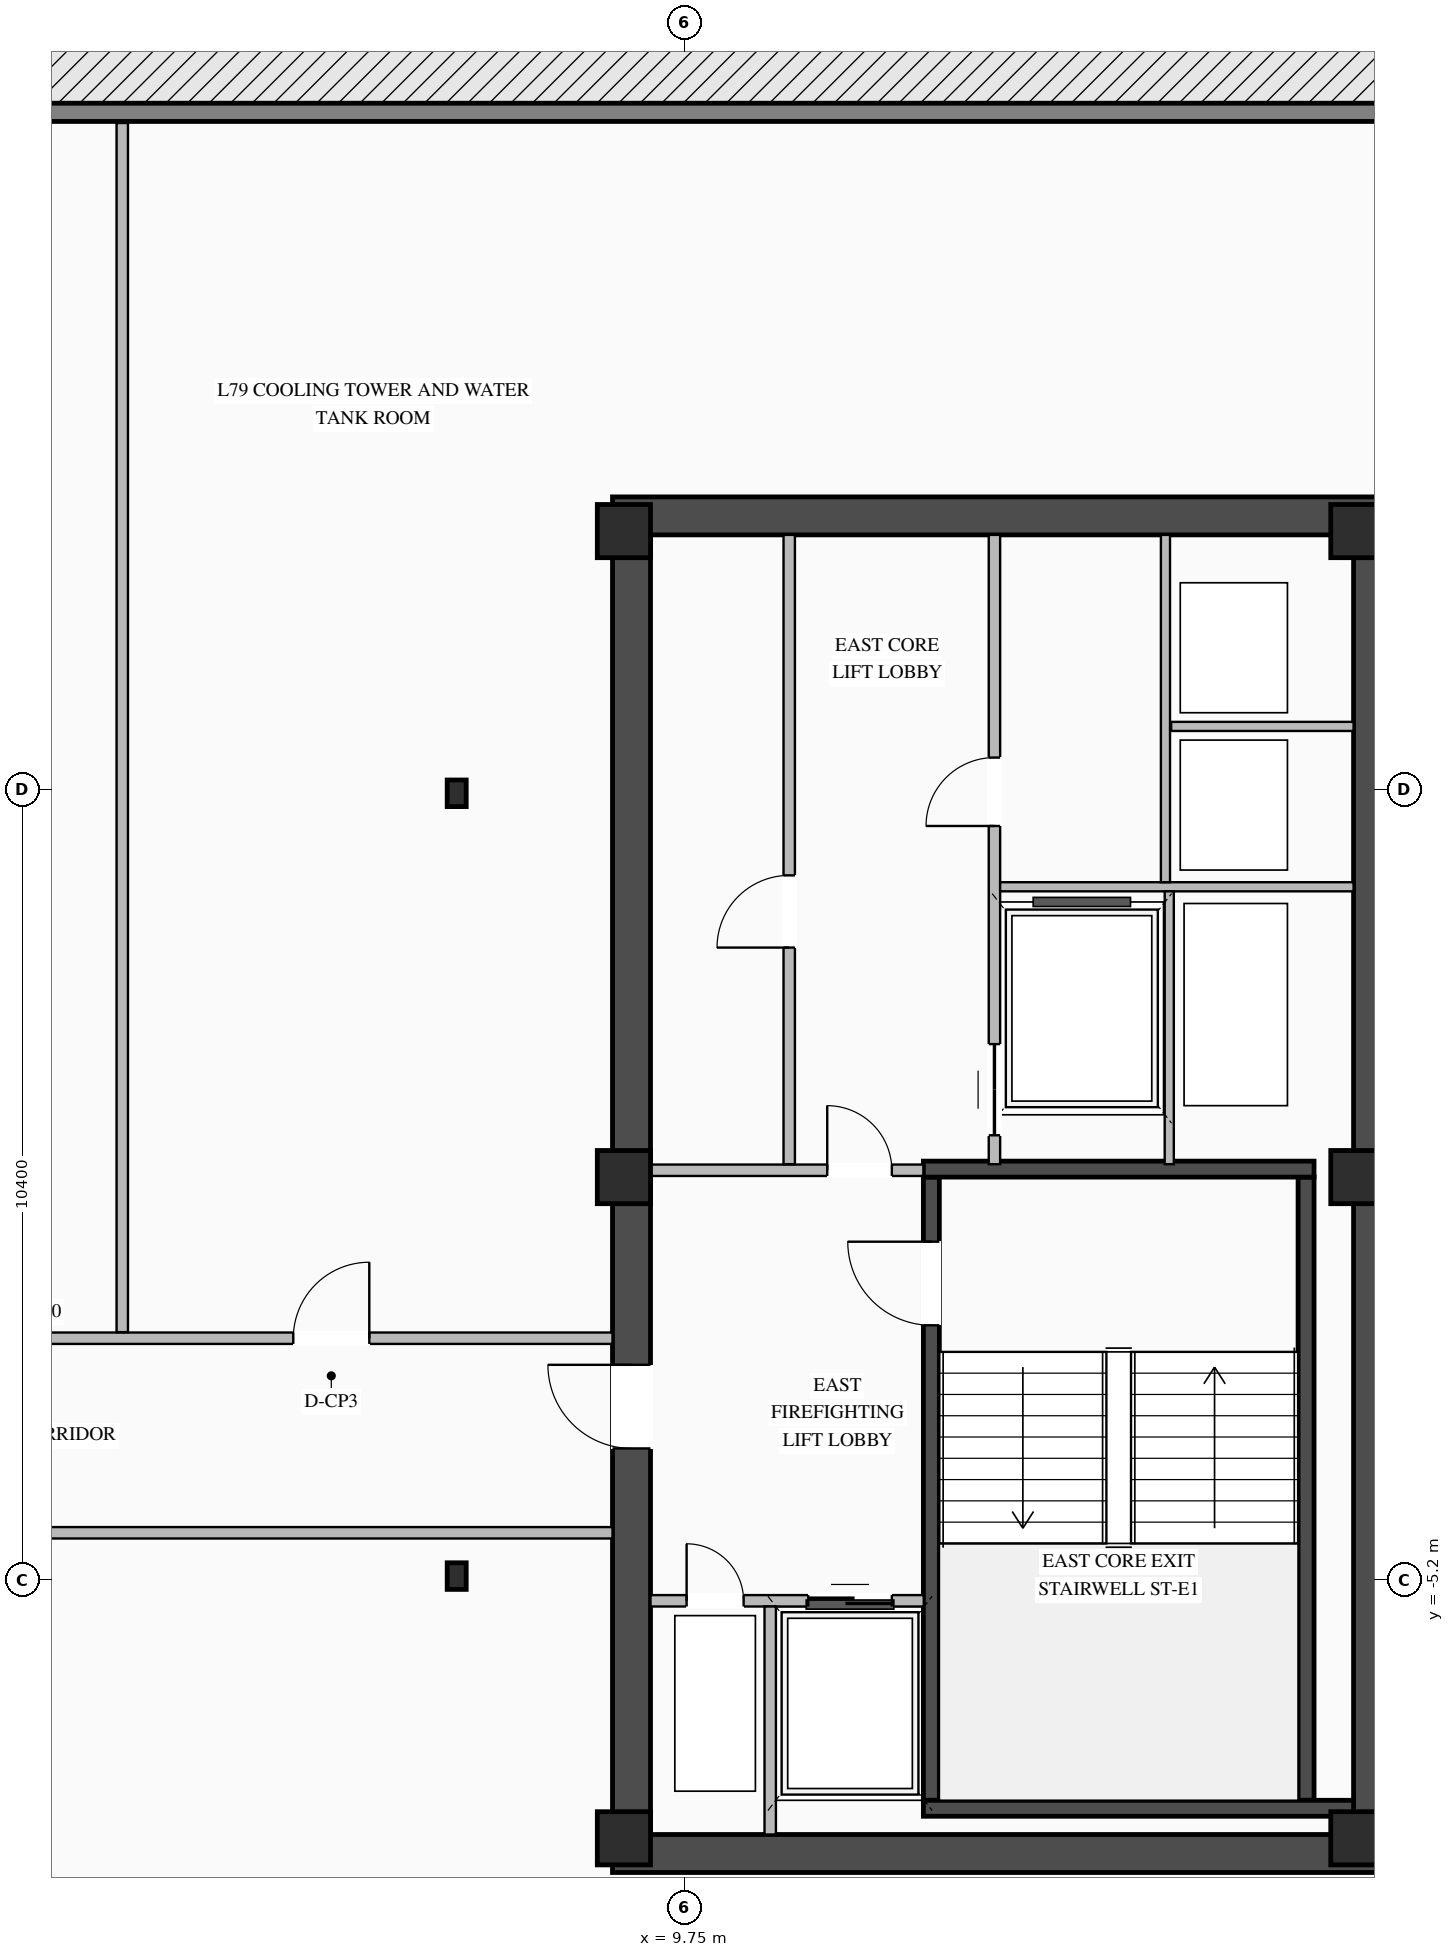
"""IFC4 building model, lengths in metres.
Left out: names, types, materials, properties, quantities, classifications, styles, units other than length and angle.
Written with IfcOpenShell. Run it as: python <this file> out.ifc"""

import sys

from ifc_helpers import new_model, si_unit, direction, frame, frame_2d, origin, origin_2d, place, context, subcontext, project, spatial, rectangle, i_section, extrude, element, fill, save


model = new_model("IFC4")
c1 = context("Model", 3, precision=1e-05, world=origin(), true_north=direction((0.0, 1.0)))
c2 = subcontext(c1, "Body", "Model", "MODEL_VIEW")
j1 = project(units=[si_unit("LENGTHUNIT", "METRE"), si_unit("PLANEANGLEUNIT", "RADIAN")], contexts=[c1])
p1 = place(None, origin())
s1 = spatial("IfcSite", under=j1, at=p1, CompositionType="ELEMENT")
p2 = place(p1, origin())
s2 = spatial("IfcBuilding", under=s1, at=p2, CompositionType="ELEMENT")
p3 = place(p2, frame((0.0, 0.0, 290.55)))
s3 = spatial("IfcBuildingStorey", under=s2, at=p3, CompositionType="ELEMENT", Elevation=290.55)
for number, where, z_axis, x_axis in (
    (1, (8.8, -8.8, 0.0), (0.0, 0.0, 1.0), (1.0, 0.0, 0.0)),
    (2, (8.8, 8.8, 0.0), (0.0, 0.0, 1.0), (1.0, 0.0, 0.0)),
):
    element("IfcWall", number, at=place(p3, frame(where, z_axis=z_axis, x_axis=x_axis)), inside=s3, PredefinedType="SHEAR", context=c2, shape_type="SweptSolid", body=[
        extrude(rectangle(XDim=10.25, YDim=0.5, at=frame_2d((5.125, 0.0))), origin(), (0.0, 0.0, 1.0), 3.35),
    ])
p4 = place(p3, frame((9.05, -8.55, 0.0), z_axis=(0.0, 0.0, 1.0), x_axis=(0.0, 1.0, 0.0)))
e3 = element("IfcWall", 3, at=p4, inside=s3, PredefinedType="SHEAR", context=c2, shape_type="SweptSolid", body=[
    extrude(rectangle(XDim=17.1, YDim=0.5, at=frame_2d((8.55, 0.0))), origin(), (0.0, 0.0, 1.0), 3.35),
])
p5 = place(p4, frame((5.08, 0.0, 0.0)))
e4 = element("IfcOpeningElement", 4, at=p5, cuts=e3, PredefinedType="OPENING", context=c2, shape_type="SweptSolid", body=[
    extrude(rectangle(XDim=1.1, YDim=2.08, at=frame_2d((0.55, 1.04))), frame((0.0, 0.26, 0.0), z_axis=(0.0, -1.0, 0.0), x_axis=(1.0, 0.0, 0.0)), (0.0, 0.0, 1.0), 0.52),
])
p6 = place(p3, frame((18.8, -8.55, 0.0), z_axis=(0.0, 0.0, 1.0), x_axis=(0.0, 1.0, 0.0)))
e5 = element("IfcWall", 5, at=p6, inside=s3, PredefinedType="SHEAR", context=c2, shape_type="SweptSolid", body=[
    extrude(rectangle(XDim=17.1, YDim=0.5, at=frame_2d((8.55, 0.0))), origin(), (0.0, 0.0, 1.0), 3.35),
])
p7 = place(p3, frame((12.995, -8.1, 0.0), z_axis=(0.0, 0.0, 1.0), x_axis=(0.0, 1.0, 0.0)))
e6 = element("IfcWall", 6, at=p7, inside=s3, PredefinedType="SHEAR", context=c2, shape_type="SweptSolid", body=[
    extrude(rectangle(XDim=8.2, YDim=0.21, at=frame_2d((4.1, 0.0))), origin(), (0.0, 0.0, 1.0), 3.35),
])
p8 = place(p7, frame((6.25, 0.0, 0.0)))
e7 = element("IfcOpeningElement", 7, at=p8, cuts=e6, PredefinedType="OPENING", context=c2, shape_type="SweptSolid", body=[
    extrude(rectangle(XDim=1.1, YDim=2.15, at=frame_2d((0.55, 1.075))), frame((0.0, 0.115, 0.0), z_axis=(0.0, -1.0, 0.0), x_axis=(1.0, 0.0, 0.0)), (0.0, 0.0, 1.0), 0.23),
])
p9 = place(p3, frame((17.925, -8.1, 0.0), z_axis=(0.0, 0.0, 1.0), x_axis=(0.0, 1.0, 0.0)))
e8 = element("IfcWall", 8, at=p9, inside=s3, PredefinedType="SHEAR", context=c2, shape_type="SweptSolid", body=[
    extrude(rectangle(XDim=8.2, YDim=0.21, at=frame_2d((4.1, 0.0))), origin(), (0.0, 0.0, 1.0), 3.35),
])
p10 = place(p3, frame((12.89, -8.205, 0.0), z_axis=(0.0, 0.0, 1.0), x_axis=(1.0, 0.0, 0.0)))
e9 = element("IfcWall", 9, at=p10, inside=s3, PredefinedType="SHEAR", context=c2, shape_type="SweptSolid", body=[
    extrude(rectangle(XDim=5.66, YDim=0.21, at=frame_2d((2.83, 0.0))), origin(), (0.0, 0.0, 1.0), 3.35),
])
p11 = place(p3, frame((18.03, 0.205, 0.0), z_axis=(0.0, 0.0, 1.0), x_axis=(-1.0, 0.0, 0.0)))
e10 = element("IfcWall", 10, at=p11, inside=s3, PredefinedType="SHEAR", context=c2, shape_type="SweptSolid", body=[
    extrude(rectangle(XDim=5.14, YDim=0.21, at=frame_2d((2.57, 0.0))), origin(), (0.0, 0.0, 1.0), 3.35),
])
for number, where, z_axis, x_axis in (
    (11, (8.95, -8.6, 0.0), (0.0, 0.0, 1.0), (1.0, 0.0, 0.0)),
    (12, (8.95, 0.1, 0.0), (0.0, 0.0, 1.0), (1.0, 0.0, 0.0)),
    (13, (8.95, 8.6, 0.0), (0.0, 0.0, 1.0), (1.0, 0.0, 0.0)),
    (14, (18.6, -8.6, 0.0), (0.0, 0.0, 1.0), (1.0, 0.0, 0.0)),
    (15, (18.6, 0.1, 0.0), (0.0, 0.0, 1.0), (1.0, 0.0, 0.0)),
    (16, (18.6, 8.6, 0.0), (0.0, 0.0, 1.0), (1.0, 0.0, 0.0)),
):
    element("IfcColumn", number, at=place(p3, frame(where, z_axis=z_axis, x_axis=x_axis)), inside=s3, PredefinedType="COLUMN", context=c2, shape_type="SweptSolid", body=[
        extrude(rectangle(XDim=0.7, YDim=0.7, at=origin_2d()), origin(), (0.0, 0.0, 1.0), 3.6),
    ])
for number, where, z_axis, x_axis in (
    (17, (6.75, -5.15, 0.0), (0.0, 0.0, 1.0), (1.0, 0.0, 0.0)),
    (18, (6.75, 5.15, 0.0), (0.0, 0.0, 1.0), (1.0, 0.0, 0.0)),
):
    element("IfcColumn", number, at=place(p3, frame(where, z_axis=z_axis, x_axis=x_axis)), inside=s3, PredefinedType="COLUMN", context=c2, shape_type="SweptSolid", body=[
        extrude(i_section(OverallWidth=0.25, OverallDepth=0.35, WebThickness=0.01, FlangeThickness=0.012, at=origin_2d()), origin(), (0.0, 0.0, 1.0), 3.6),
    ])
p12 = place(p3, frame((25.76, 14.11, 0.0), z_axis=(0.0, 0.0, 1.0), x_axis=(-1.0, 0.0, 0.0)))
e19 = element("IfcWall", 19, at=p12, inside=s3, PredefinedType="STANDARD", context=c2, shape_type="SweptSolid", body=[
    extrude(rectangle(XDim=47.12, YDim=0.24, at=frame_2d((23.56, 0.0))), origin(), (0.0, 0.0, 1.0), 3.33),
])
p13 = place(p3, frame((-10.19, 14.482, 0.0), z_axis=(0.0, 0.0, 1.0), x_axis=(0.995396003119, 0.095847780233, 0.0)))
e20 = element("IfcWall", 20, at=p13, inside=s3, PredefinedType="PARAPET", context=c2, shape_type="SweptSolid", body=[
    extrude(rectangle(XDim=36.391, YDim=0.25, at=frame_2d((18.196, 0.0))), origin(), (0.0, 0.0, 1.0), 1.2),
])
p14 = place(p3, frame((9.3, -5.475, 0.0), z_axis=(0.0, 0.0, 1.0), x_axis=(1.0, 0.0, 0.0)))
e21 = element("IfcWall", 21, at=p14, inside=s3, PredefinedType="STANDARD", context=c2, shape_type="SweptSolid", body=[
    extrude(rectangle(XDim=3.595, YDim=0.15, at=frame_2d((1.797, 0.0))), origin(), (0.0, 0.0, 1.0), 3.33),
])
p15 = place(p14, frame((2.075, 0.0, 0.0)))
e22 = element("IfcOpeningElement", 22, at=p15, cuts=e21, PredefinedType="OPENING", context=c2, shape_type="SweptSolid", body=[
    extrude(rectangle(XDim=1.1, YDim=2.15, at=frame_2d((0.55, 1.075))), frame((0.0, 0.085, 0.0), z_axis=(0.0, -1.0, 0.0), x_axis=(1.0, 0.0, 0.0)), (0.0, 0.0, 1.0), 0.17),
])
p16 = place(p14, frame((0.475, 0.0, 0.0)))
e23 = element("IfcOpeningElement", 23, at=p16, cuts=e21, PredefinedType="OPENING", context=c2, shape_type="SweptSolid", body=[
    extrude(rectangle(XDim=0.75, YDim=2.05, at=frame_2d((0.375, 1.025))), frame((0.0, 0.085, 0.0), z_axis=(0.0, -1.0, 0.0), x_axis=(1.0, 0.0, 0.0)), (0.0, 0.0, 1.0), 0.17),
])
p17 = place(p3, frame((10.875, -8.55, 0.0), z_axis=(0.0, 0.0, 1.0), x_axis=(0.0, 1.0, 0.0)))
e24 = element("IfcWall", 24, at=p17, inside=s3, PredefinedType="STANDARD", context=c2, shape_type="SweptSolid", body=[
    extrude(rectangle(XDim=3.0, YDim=0.15, at=frame_2d((1.5, 0.0))), origin(), (0.0, 0.0, 1.0), 3.33),
])
p18 = place(p3, frame((9.3, 0.19, 0.0), z_axis=(0.0, 0.0, 1.0), x_axis=(1.0, 0.0, 0.0)))
e25 = element("IfcWall", 25, at=p18, inside=s3, PredefinedType="STANDARD", context=c2, shape_type="SweptSolid", body=[
    extrude(rectangle(XDim=3.59, YDim=0.15, at=frame_2d((1.795, 0.0))), origin(), (0.0, 0.0, 1.0), 2.825),
])
p19 = place(p18, frame((2.325, 0.0, 0.0)))
e26 = element("IfcOpeningElement", 26, at=p19, cuts=e25, PredefinedType="OPENING", context=c2, shape_type="SweptSolid", body=[
    extrude(rectangle(XDim=0.85, YDim=2.04, at=frame_2d((0.425, 1.02))), frame((0.0, 0.085, 0.0), z_axis=(0.0, -1.0, 0.0), x_axis=(1.0, 0.0, 0.0)), (0.0, 0.0, 1.0), 0.17),
])
p20 = place(p3, frame((11.125, 0.27, 0.0), z_axis=(0.0, 0.0, 1.0), x_axis=(0.0, 1.0, 0.0)))
e27 = element("IfcWall", 27, at=p20, inside=s3, PredefinedType="STANDARD", context=c2, shape_type="SweptSolid", body=[
    extrude(rectangle(XDim=8.28, YDim=0.15, at=frame_2d((4.14, 0.0))), origin(), (0.0, 0.0, 1.0), 3.33),
])
p21 = place(p20, frame((2.85, 0.0, 0.0)))
e28 = element("IfcOpeningElement", 28, at=p21, cuts=e27, PredefinedType="OPENING", context=c2, shape_type="SweptSolid", body=[
    extrude(rectangle(XDim=0.95, YDim=2.05, at=frame_2d((0.475, 1.025))), frame((0.0, 0.085, 0.0), z_axis=(0.0, -1.0, 0.0), x_axis=(1.0, 0.0, 0.0)), (0.0, 0.0, 1.0), 0.17),
])
p22 = place(p3, frame((13.825, 0.27, 0.0), z_axis=(0.0, 0.0, 1.0), x_axis=(0.0, 1.0, 0.0)))
e29 = element("IfcWall", 29, at=p22, inside=s3, PredefinedType="STANDARD", context=c2, shape_type="SweptSolid", body=[
    extrude(rectangle(XDim=8.28, YDim=0.15, at=frame_2d((4.14, 0.0))), origin(), (0.0, 0.0, 1.0), 3.33),
])
p23 = place(p22, frame((4.45, 0.0, 0.0)))
e30 = element("IfcOpeningElement", 30, at=p23, cuts=e29, PredefinedType="OPENING", context=c2, shape_type="SweptSolid", body=[
    extrude(rectangle(XDim=0.9, YDim=2.05, at=frame_2d((0.45, 1.025))), frame((0.0, 0.085, 0.0), z_axis=(0.0, -1.0, 0.0), x_axis=(1.0, 0.0, 0.0)), (0.0, 0.0, 1.0), 0.17),
])
p24 = place(p22, frame((0.38, 0.0, 0.0)))
e31 = element("IfcOpeningElement", 31, at=p24, cuts=e29, PredefinedType="OPENING", context=c2, shape_type="SweptSolid", body=[
    extrude(rectangle(XDim=1.2, YDim=2.1, at=frame_2d((0.6, 1.05))), frame((0.0, 0.085, 0.0), z_axis=(0.0, -1.0, 0.0), x_axis=(1.0, 0.0, 0.0)), (0.0, 0.0, 1.0), 0.17),
])
p25 = place(p3, frame((13.9, 3.92, 0.0), z_axis=(0.0, 0.0, 1.0), x_axis=(1.0, 0.0, 0.0)))
e32 = element("IfcWall", 32, at=p25, inside=s3, PredefinedType="STANDARD", context=c2, shape_type="SweptSolid", body=[
    extrude(rectangle(XDim=4.65, YDim=0.12, at=frame_2d((2.325, 0.0))), origin(), (0.0, 0.0, 1.0), 3.33),
])
p26 = place(p3, frame((16.15, 6.03, 0.0), z_axis=(0.0, 0.0, 1.0), x_axis=(1.0, 0.0, 0.0)))
e33 = element("IfcWall", 33, at=p26, inside=s3, PredefinedType="STANDARD", context=c2, shape_type="SweptSolid", body=[
    extrude(rectangle(XDim=2.4, YDim=0.12, at=frame_2d((1.2, 0.0))), origin(), (0.0, 0.0, 1.0), 3.33),
])
p27 = place(p3, frame((16.075, 3.98, 0.0), z_axis=(0.0, 0.0, 1.0), x_axis=(0.0, 1.0, 0.0)))
e34 = element("IfcWall", 34, at=p27, inside=s3, PredefinedType="STANDARD", context=c2, shape_type="SweptSolid", body=[
    extrude(rectangle(XDim=4.57, YDim=0.12, at=frame_2d((2.285, 0.0))), origin(), (0.0, 0.0, 1.0), 3.33),
])
p28 = place(p3, frame((16.125, 0.27, 0.0), z_axis=(0.0, 0.0, 1.0), x_axis=(0.0, 1.0, 0.0)))
e35 = element("IfcWall", 35, at=p28, inside=s3, PredefinedType="STANDARD", context=c2, shape_type="SweptSolid", body=[
    extrude(rectangle(XDim=3.59, YDim=0.12, at=frame_2d((1.795, 0.0))), origin(), (0.0, 0.0, 1.0), 3.33),
])
p29 = place(p3, frame((-8.8, -2.02, 0.0), z_axis=(0.0, 0.0, 1.0), x_axis=(1.0, 0.0, 0.0)))
e36 = element("IfcWall", 36, at=p29, inside=s3, PredefinedType="STANDARD", context=c2, shape_type="SweptSolid", body=[
    extrude(rectangle(XDim=17.6, YDim=0.15, at=frame_2d((8.8, 0.0))), origin(), (0.0, 0.0, 1.0), 3.33),
])
p30 = place(p29, frame((4.6, 0.0, 0.0)))
e37 = element("IfcOpeningElement", 37, at=p30, cuts=e36, PredefinedType="OPENING", context=c2, shape_type="SweptSolid", body=[
    extrude(rectangle(XDim=1.0, YDim=2.02, at=frame_2d((0.5, 1.01))), frame((0.0, 0.085, 0.0), z_axis=(0.0, -1.0, 0.0), x_axis=(1.0, 0.0, 0.0)), (0.0, 0.0, 1.0), 0.17),
])
p31 = place(p29, frame((13.4, 0.0, 0.0)))
e38 = element("IfcOpeningElement", 38, at=p31, cuts=e36, PredefinedType="OPENING", context=c2, shape_type="SweptSolid", body=[
    extrude(rectangle(XDim=1.0, YDim=2.02, at=frame_2d((0.5, 1.01))), frame((0.0, 0.085, 0.0), z_axis=(0.0, -1.0, 0.0), x_axis=(1.0, 0.0, 0.0)), (0.0, 0.0, 1.0), 0.17),
])
p32 = place(p3, frame((2.35, -1.94, 0.0), z_axis=(0.0, 0.0, 1.0), x_axis=(0.0, 1.0, 0.0)))
e39 = element("IfcWall", 39, at=p32, inside=s3, PredefinedType="STANDARD", context=c2, shape_type="SweptSolid", body=[
    extrude(rectangle(XDim=15.91, YDim=0.15, at=frame_2d((7.955, 0.0))), origin(), (0.0, 0.0, 1.0), 3.33),
])
p33 = place(p3, frame((-8.8, -4.58, 0.0), z_axis=(0.0, 0.0, 1.0), x_axis=(1.0, 0.0, 0.0)))
e40 = element("IfcWall", 40, at=p33, inside=s3, PredefinedType="STANDARD", context=c2, shape_type="SweptSolid", body=[
    extrude(rectangle(XDim=17.6, YDim=0.15, at=frame_2d((8.8, 0.0))), origin(), (0.0, 0.0, 1.0), 3.33),
])
p34 = place(p33, frame((4.6, 0.0, 0.0)))
e41 = element("IfcOpeningElement", 41, at=p34, cuts=e40, PredefinedType="OPENING", context=c2, shape_type="SweptSolid", body=[
    extrude(rectangle(XDim=1.0, YDim=2.02, at=frame_2d((0.5, 1.01))), frame((0.0, 0.085, 0.0), z_axis=(0.0, -1.0, 0.0), x_axis=(1.0, 0.0, 0.0)), (0.0, 0.0, 1.0), 0.17),
])
p35 = place(p8, origin())
e42 = element("IfcDoor", 42, at=p35, inside=s3, OperationType="SINGLE_SWING_RIGHT", PredefinedType="DOOR", context=c2, shape_type="SweptSolid", body=[
    extrude(rectangle(XDim=1.1, YDim=2.15, at=frame_2d((0.55, 1.075))), frame((0.0, 0.025, 0.0), z_axis=(0.0, -1.0, 0.0), x_axis=(1.0, 0.0, 0.0)), (0.0, 0.0, 1.0), 0.05),
])
fill(e7, e42)
p36 = place(p15, origin())
e43 = element("IfcDoor", 43, at=p36, inside=s3, OperationType="DOUBLE_DOOR_SLIDING", PredefinedType="DOOR", context=c2, shape_type="SweptSolid", body=[
    extrude(rectangle(XDim=1.1, YDim=2.15, at=frame_2d((0.55, 1.075))), frame((0.0, 0.025, 0.0), z_axis=(0.0, -1.0, 0.0), x_axis=(1.0, 0.0, 0.0)), (0.0, 0.0, 1.0), 0.05),
])
fill(e22, e43)
p37 = place(p16, origin())
e44 = element("IfcDoor", 44, at=p37, inside=s3, OperationType="SINGLE_SWING_LEFT", PredefinedType="DOOR", context=c2, shape_type="SweptSolid", body=[
    extrude(rectangle(XDim=0.75, YDim=2.05, at=frame_2d((0.375, 1.025))), frame((0.0, 0.025, 0.0), z_axis=(0.0, -1.0, 0.0), x_axis=(1.0, 0.0, 0.0)), (0.0, 0.0, 1.0), 0.05),
])
fill(e23, e44)
p38 = place(p19, origin())
e45 = element("IfcDoor", 45, at=p38, inside=s3, OperationType="SINGLE_SWING_LEFT", PredefinedType="DOOR", context=c2, shape_type="SweptSolid", body=[
    extrude(rectangle(XDim=0.85, YDim=2.04, at=frame_2d((0.425, 1.02))), frame((0.0, 0.025, 0.0), z_axis=(0.0, -1.0, 0.0), x_axis=(1.0, 0.0, 0.0)), (0.0, 0.0, 1.0), 0.05),
])
fill(e26, e45)
p39 = place(p5, origin())
e46 = element("IfcDoor", 46, at=p39, inside=s3, OperationType="SINGLE_SWING_RIGHT", PredefinedType="DOOR", context=c2, shape_type="SweptSolid", body=[
    extrude(rectangle(XDim=1.1, YDim=2.08, at=frame_2d((0.55, 1.04))), frame((0.0, -0.155, 0.0), z_axis=(0.0, -1.0, 0.0), x_axis=(1.0, 0.0, 0.0)), (0.0, 0.0, 1.0), 0.05),
])
fill(e4, e46)
p40 = place(p21, origin())
e47 = element("IfcDoor", 47, at=p40, inside=s3, OperationType="SINGLE_SWING_LEFT", PredefinedType="DOOR", context=c2, shape_type="SweptSolid", body=[
    extrude(rectangle(XDim=0.95, YDim=2.05, at=frame_2d((0.475, 1.025))), frame((0.0, 0.025, 0.0), z_axis=(0.0, -1.0, 0.0), x_axis=(1.0, 0.0, 0.0)), (0.0, 0.0, 1.0), 0.05),
])
fill(e28, e47)
p41 = place(p23, origin())
e48 = element("IfcDoor", 48, at=p41, inside=s3, OperationType="SINGLE_SWING_LEFT", PredefinedType="DOOR", context=c2, shape_type="SweptSolid", body=[
    extrude(rectangle(XDim=0.9, YDim=2.05, at=frame_2d((0.45, 1.025))), frame((0.0, 0.025, 0.0), z_axis=(0.0, -1.0, 0.0), x_axis=(1.0, 0.0, 0.0)), (0.0, 0.0, 1.0), 0.05),
])
fill(e30, e48)
p42 = place(p24, origin())
e49 = element("IfcDoor", 49, at=p42, inside=s3, OperationType="DOUBLE_DOOR_SLIDING", PredefinedType="DOOR", context=c2, shape_type="SweptSolid", body=[
    extrude(rectangle(XDim=1.2, YDim=2.1, at=frame_2d((0.6, 1.05))), frame((0.0, 0.025, 0.0), z_axis=(0.0, -1.0, 0.0), x_axis=(1.0, 0.0, 0.0)), (0.0, 0.0, 1.0), 0.05),
])
fill(e31, e49)
p43 = place(p31, origin())
e50 = element("IfcDoor", 50, at=p43, inside=s3, OperationType="SINGLE_SWING_RIGHT", PredefinedType="DOOR", context=c2, shape_type="SweptSolid", body=[
    extrude(rectangle(XDim=1.0, YDim=2.02, at=frame_2d((0.5, 1.01))), frame((0.0, 0.025, 0.0), z_axis=(0.0, -1.0, 0.0), x_axis=(1.0, 0.0, 0.0)), (0.0, 0.0, 1.0), 0.05),
])
fill(e38, e50)
save(model, sys.argv[1])
